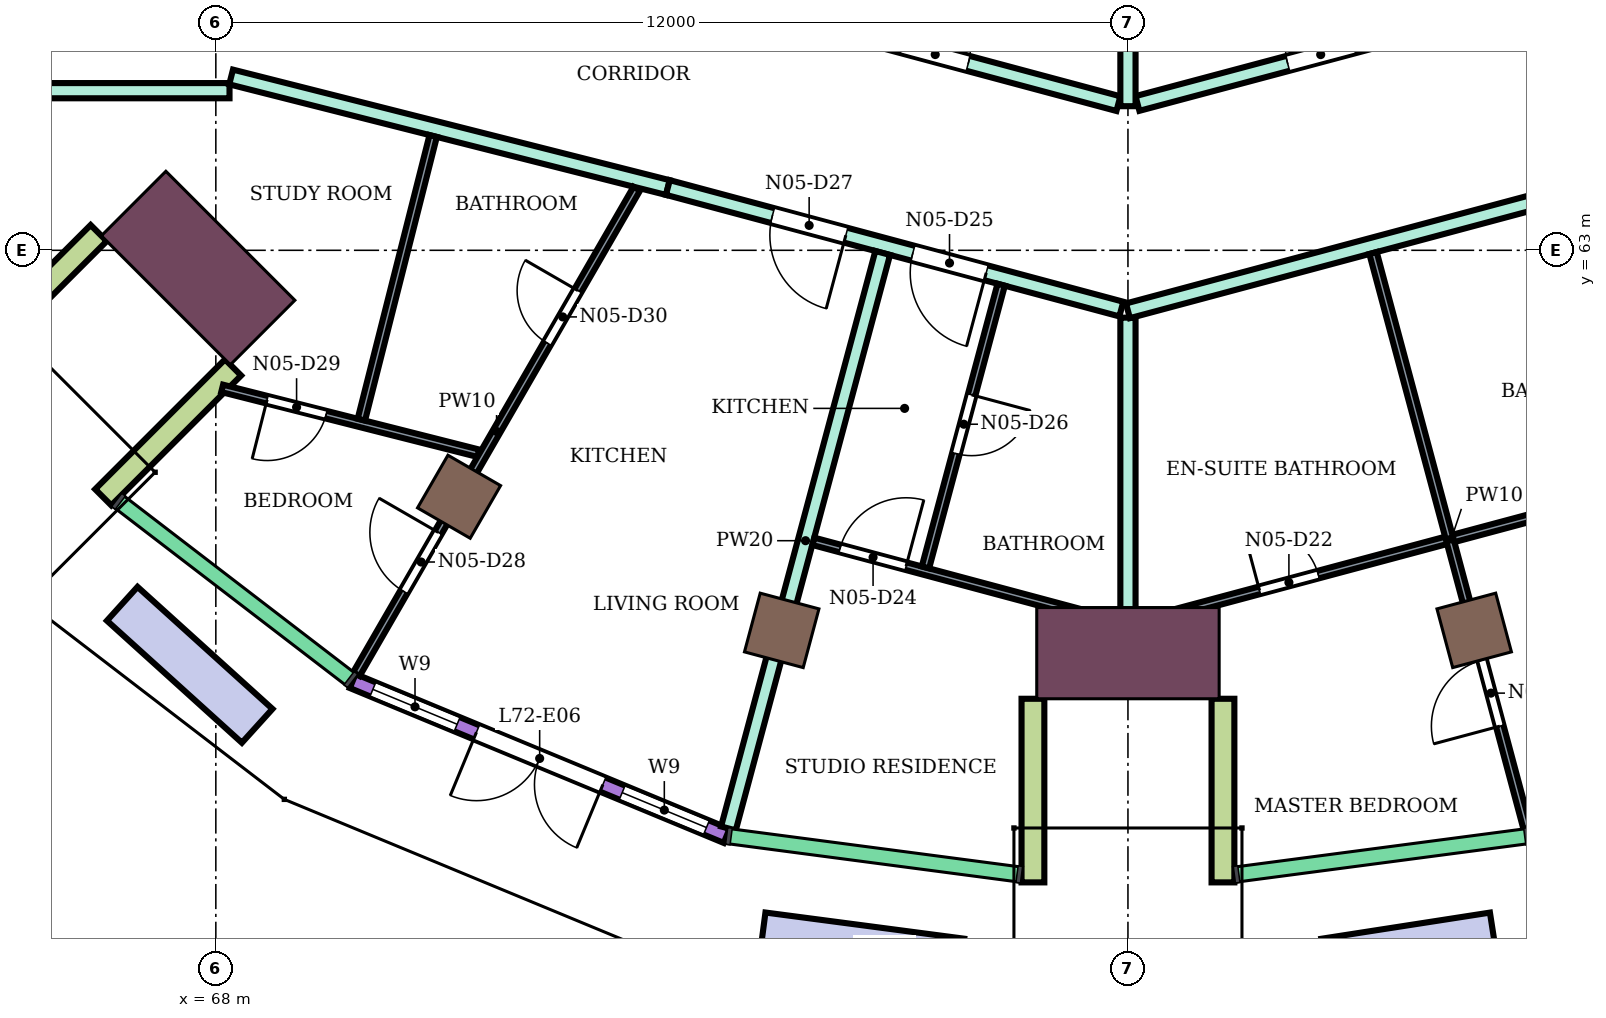
"""IFC4 building model, lengths in metres.
Left out: names, types, materials, properties, quantities, classifications, styles, units other than length and angle.
Written with IfcOpenShell. Run it as: python <this file> out.ifc"""

import sys

from ifc_helpers import new_model, si_unit, direction, frame, frame_2d, origin, origin_2d, place, context, subcontext, project, spatial, rectangle, extrude, element, fill, save


model = new_model("IFC4")
c1 = context("Model", 3, precision=1e-05, world=origin(), true_north=direction((0.0, 1.0)))
c2 = subcontext(c1, "Body", "Model", "MODEL_VIEW")
j1 = project(units=[si_unit("LENGTHUNIT", "METRE"), si_unit("PLANEANGLEUNIT", "RADIAN")], contexts=[c1])
p1 = place(None, origin())
s1 = spatial("IfcSite", under=j1, at=p1, CompositionType="ELEMENT")
p2 = place(p1, origin())
s2 = spatial("IfcBuilding", under=s1, at=p2, CompositionType="ELEMENT")
p3 = place(p2, frame((0.0, 0.0, 314.9)))
s3 = spatial("IfcBuildingStorey", under=s2, at=p3, CompositionType="ELEMENT", Elevation=314.9)
for number, where, z_axis, x_axis in (
    (1, (71.2, 59.758, 0.0), (0.0, 0.0, 1.0), (-0.5, -0.866, 0.0)),
    (2, (75.445, 58.0, 0.0), (0.0, 0.0, 1.0), (-0.259, -0.966, 0.0)),
    (3, (84.555, 58.0, 0.0), (0.0, 0.0, 1.0), (0.259, -0.966, 0.0)),
):
    element("IfcColumn", number, at=place(p3, frame(where, z_axis=z_axis, x_axis=x_axis)), inside=s3, PredefinedType="COLUMN", context=c2, shape_type="SweptSolid", body=[
        extrude(rectangle(XDim=0.8, YDim=0.8, at=origin_2d()), origin(), (0.0, 0.0, 1.0), 4.4),
    ])
for number, where, z_axis, x_axis in (
    (4, (67.767, 62.767, 0.0), (0.0, 0.0, 1.0), (-0.707, -0.707, 0.0)),
    (5, (80.0, 57.7, 0.0), (0.0, 0.0, 1.0), (0.0, -1.0, 0.0)),
):
    element("IfcColumn", number, at=place(p3, frame(where, z_axis=z_axis, x_axis=x_axis)), inside=s3, PredefinedType="COLUMN", context=c2, shape_type="SweptSolid", body=[
        extrude(rectangle(XDim=1.2, YDim=2.4, at=origin_2d()), origin(), (0.0, 0.0, 1.0), 4.4),
    ])
p4 = place(p3, frame((69.801, 57.334, 0.0), z_axis=(0.0, 0.0, 1.0), x_axis=(0.923876574156, -0.382690574388, 0.0)))
e6 = element("IfcWall", 6, at=p4, inside=s3, PredefinedType="NOTDEFINED", context=c2, shape_type="SweptSolid", body=[
    extrude(rectangle(XDim=5.325, YDim=0.2, at=frame_2d((2.663, 0.0))), origin(), (0.0, 0.0, 1.0), 4.4),
])
p5 = place(p4, frame((0.288, 0.0, 0.9)))
e7 = element("IfcOpeningElement", 7, at=p5, cuts=e6, PredefinedType="OPENING", context=c2, shape_type="SweptSolid", body=[
    extrude(rectangle(XDim=1.2, YDim=2.7, at=frame_2d((0.6, 1.35))), frame((0.0, 0.11, 0.0), z_axis=(0.0, -1.0, 0.0), x_axis=(1.0, 0.0, 0.0)), (0.0, 0.0, 1.0), 0.22),
])
p6 = place(p4, frame((1.763, 0.0, 0.0)))
e8 = element("IfcOpeningElement", 8, at=p6, cuts=e6, PredefinedType="OPENING", context=c2, shape_type="SweptSolid", body=[
    extrude(rectangle(XDim=1.8, YDim=2.7, at=frame_2d((0.9, 1.35))), frame((0.0, 0.11, 0.0), z_axis=(0.0, -1.0, 0.0), x_axis=(1.0, 0.0, 0.0)), (0.0, 0.0, 1.0), 0.22),
])
p7 = place(p4, frame((3.838, 0.0, 0.9)))
e9 = element("IfcOpeningElement", 9, at=p7, cuts=e6, PredefinedType="OPENING", context=c2, shape_type="SweptSolid", body=[
    extrude(rectangle(XDim=1.2, YDim=2.7, at=frame_2d((0.6, 1.35))), frame((0.0, 0.11, 0.0), z_axis=(0.0, -1.0, 0.0), x_axis=(1.0, 0.0, 0.0)), (0.0, 0.0, 1.0), 0.22),
])
for number, where, z_axis, x_axis in (
    (10, (66.459, 63.227, 0.0), (0.0, 0.0, 1.0), (-0.707, -0.707, 0.0)),
    (11, (68.227, 61.459, 0.0), (0.0, 0.0, 1.0), (-0.707, -0.707, 0.0)),
    (12, (78.75, 57.1, 0.0), (0.0, 0.0, 1.0), (0.0, -1.0, 0.0)),
    (13, (81.25, 57.1, 0.0), (0.0, 0.0, 1.0), (0.0, -1.0, 0.0)),
):
    element("IfcWall", number, at=place(p3, frame(where, z_axis=z_axis, x_axis=x_axis)), inside=s3, PredefinedType="NOTDEFINED", context=c2, shape_type="SweptSolid", body=[
        extrude(rectangle(XDim=2.416, YDim=0.3, at=frame_2d((1.208, 0.0))), origin(), (0.0, 0.0, 1.0), 4.4),
    ])
p8 = place(p3, frame((66.769, 58.35, 0.0), z_axis=(0.0, 0.0, 1.0), x_axis=(0.741658991894, -0.670777116293, 0.0)))
e14 = element("IfcWall", 14, at=p8, inside=s3, PredefinedType="USERDEFINED", context=c2, shape_type="SweptSolid", body=[
    extrude(rectangle(XDim=2.394, YDim=0.6, at=frame_2d((1.197, 0.0))), origin(), (0.0, 0.0, 1.0), 0.6),
])
p9 = place(p3, frame((75.192, 53.99, 0.0), z_axis=(0.0, 0.0, 1.0), x_axis=(0.991436014481, -0.130593373453, 0.0)))
e15 = element("IfcWall", 15, at=p9, inside=s3, PredefinedType="USERDEFINED", context=c2, shape_type="SweptSolid", body=[
    extrude(rectangle(XDim=2.638, YDim=0.6, at=frame_2d((1.319, 0.0))), origin(), (0.0, 0.0, 1.0), 0.6),
])
p10 = place(p3, frame((82.59, 53.646, 0.0), z_axis=(0.0, 0.0, 1.0), x_axis=(0.988158273159, 0.153438023927, 0.0)))
e16 = element("IfcWall", 16, at=p10, inside=s3, PredefinedType="USERDEFINED", context=c2, shape_type="SweptSolid", body=[
    extrude(rectangle(XDim=2.245, YDim=0.6, at=frame_2d((1.123, 0.0))), origin(), (0.0, 0.0, 1.0), 0.6),
])
p11 = place(p3, frame((65.2, 65.1, 0.0), z_axis=(0.0, 0.0, 1.0), x_axis=(1.0, 0.0, 0.0)))
e17 = element("IfcWall", 17, at=p11, inside=s3, PredefinedType="PARTITIONING", context=c2, shape_type="SweptSolid", body=[
    extrude(rectangle(XDim=2.98, YDim=0.2, at=frame_2d((1.49, 0.0))), origin(), (0.0, 0.0, 1.0), 3.95),
])
p12 = place(p3, frame((68.201, 65.28, 0.0), z_axis=(0.0, 0.0, 1.0), x_axis=(0.969421088032, -0.245403247897, 0.0)))
e18 = element("IfcWall", 18, at=p12, inside=s3, PredefinedType="PARTITIONING", context=c2, shape_type="SweptSolid", body=[
    extrude(rectangle(XDim=5.927, YDim=0.2, at=frame_2d((2.964, 0.0))), origin(), (0.0, 0.0, 1.0), 3.95),
])
p13 = place(p3, frame((73.947, 63.826, 0.0), z_axis=(0.0, 0.0, 1.0), x_axis=(0.965894934009, -0.25893430915, 0.0)))
e19 = element("IfcWall", 19, at=p13, inside=s3, PredefinedType="PARTITIONING", context=c2, shape_type="SweptSolid", body=[
    extrude(rectangle(XDim=6.177, YDim=0.2, at=frame_2d((3.088, 0.0))), origin(), (0.0, 0.0, 1.0), 3.95),
])
p14 = place(p13, frame((3.336, 0.0, 0.0)))
e20 = element("IfcOpeningElement", 20, at=p14, cuts=e19, PredefinedType="OPENING", context=c2, shape_type="SweptSolid", body=[
    extrude(rectangle(XDim=1.0, YDim=2.1, at=frame_2d((0.5, 1.05))), frame((0.0, 0.11, 0.0), z_axis=(0.0, -1.0, 0.0), x_axis=(1.0, 0.0, 0.0)), (0.0, 0.0, 1.0), 0.22),
])
p15 = place(p13, frame((1.424, 0.0, 0.0)))
e21 = element("IfcOpeningElement", 21, at=p15, cuts=e19, PredefinedType="OPENING", context=c2, shape_type="SweptSolid", body=[
    extrude(rectangle(XDim=1.0, YDim=2.1, at=frame_2d((0.5, 1.05))), frame((0.0, 0.11, 0.0), z_axis=(0.0, -1.0, 0.0), x_axis=(1.0, 0.0, 0.0)), (0.0, 0.0, 1.0), 0.22),
])
p16 = place(p3, frame((74.603, 66.342, 0.0), z_axis=(0.0, 0.0, 1.0), x_axis=(0.965920893652, -0.258837453254, 0.0)))
e22 = element("IfcWall", 22, at=p16, inside=s3, PredefinedType="PARTITIONING", context=c2, shape_type="SweptSolid", body=[
    extrude(rectangle(XDim=5.458, YDim=0.2, at=frame_2d((2.729, 0.0))), origin(), (0.0, 0.0, 1.0), 3.95),
])
p17 = place(p16, frame((2.512, 0.0, 0.0)))
e23 = element("IfcOpeningElement", 23, at=p17, cuts=e22, PredefinedType="OPENING", context=c2, shape_type="SweptSolid", body=[
    extrude(rectangle(XDim=0.9, YDim=2.1, at=frame_2d((0.45, 1.05))), frame((0.0, 0.11, 0.0), z_axis=(0.0, -1.0, 0.0), x_axis=(1.0, 0.0, 0.0)), (0.0, 0.0, 1.0), 0.22),
])
p18 = place(p3, frame((74.743, 55.394, 0.0), z_axis=(0.0, 0.0, 1.0), x_axis=(0.258969103378, 0.965885605802, 0.0)))
e24 = element("IfcWall", 24, at=p18, inside=s3, PredefinedType="PARTITIONING", context=c2, shape_type="SweptSolid", body=[
    extrude(rectangle(XDim=7.838, YDim=0.2, at=frame_2d((3.919, 0.0))), origin(), (0.0, 0.0, 1.0), 3.95),
])
p19 = place(p3, frame((80.125, 64.932, 0.0), z_axis=(0.0, 0.0, 1.0), x_axis=(0.966236955806, 0.257655089674, 0.0)))
e25 = element("IfcWall", 25, at=p19, inside=s3, PredefinedType="PARTITIONING", context=c2, shape_type="SweptSolid", body=[
    extrude(rectangle(XDim=8.039, YDim=0.2, at=frame_2d((4.02, 0.0))), origin(), (0.0, 0.0, 1.0), 3.95),
])
p20 = place(p19, frame((6.298, 0.0, 0.0)))
e26 = element("IfcOpeningElement", 26, at=p20, cuts=e25, PredefinedType="OPENING", context=c2, shape_type="SweptSolid", body=[
    extrude(rectangle(XDim=0.9, YDim=2.1, at=frame_2d((0.45, 1.05))), frame((0.0, 0.11, 0.0), z_axis=(0.0, -1.0, 0.0), x_axis=(1.0, 0.0, 0.0)), (0.0, 0.0, 1.0), 0.22),
])
p21 = place(p19, frame((2.045, 0.0, 0.0)))
e27 = element("IfcOpeningElement", 27, at=p21, cuts=e25, PredefinedType="OPENING", context=c2, shape_type="SweptSolid", body=[
    extrude(rectangle(XDim=0.9, YDim=2.1, at=frame_2d((0.45, 1.05))), frame((0.0, 0.11, 0.0), z_axis=(0.0, -1.0, 0.0), x_axis=(1.0, 0.0, 0.0)), (0.0, 0.0, 1.0), 0.22),
])
p22 = place(p3, frame((80.0, 57.3, 0.0), z_axis=(0.0, 0.0, 1.0), x_axis=(0.0, 1.0, 0.0)))
e28 = element("IfcWall", 28, at=p22, inside=s3, PredefinedType="PARTITIONING", context=c2, shape_type="SweptSolid", body=[
    extrude(rectangle(XDim=4.814, YDim=0.2, at=frame_2d((2.407, 0.0))), origin(), (0.0, 0.0, 1.0), 3.95),
])
p23 = place(p3, frame((80.0, 62.204, 0.0), z_axis=(0.0, 0.0, 1.0), x_axis=(0.965938139786, 0.258773086132, 0.0)))
e29 = element("IfcWall", 29, at=p23, inside=s3, PredefinedType="PARTITIONING", context=c2, shape_type="SweptSolid", body=[
    extrude(rectangle(XDim=6.266, YDim=0.2, at=frame_2d((3.133, 0.0))), origin(), (0.0, 0.0, 1.0), 3.95),
])
p24 = place(p3, frame((80.0, 64.896, 0.0), z_axis=(0.0, 0.0, 1.0), x_axis=(0.0, 1.0, 0.0)))
e30 = element("IfcWall", 30, at=p24, inside=s3, PredefinedType="PARTITIONING", context=c2, shape_type="SweptSolid", body=[
    extrude(rectangle(XDim=2.405, YDim=0.2, at=frame_2d((1.203, 0.0))), origin(), (0.0, 0.0, 1.0), 3.95),
])
p25 = place(p3, frame((68.083, 61.184, 0.0), z_axis=(0.0, 0.0, 1.0), x_axis=(0.969415105271, -0.245426880503, 0.0)))
e31 = element("IfcWall", 31, at=p25, inside=s3, PredefinedType="PARTITIONING", context=c2, shape_type="SweptSolid", body=[
    extrude(rectangle(XDim=3.476, YDim=0.1, at=frame_2d((1.738, 0.0))), origin(), (0.0, 0.0, 1.0), 3.95),
])
p26 = place(p25, frame((0.61, 0.0, 0.0)))
e32 = element("IfcOpeningElement", 32, at=p26, cuts=e31, PredefinedType="OPENING", context=c2, shape_type="SweptSolid", body=[
    extrude(rectangle(XDim=0.8, YDim=2.1, at=frame_2d((0.4, 1.05))), frame((0.0, 0.06, 0.0), z_axis=(0.0, -1.0, 0.0), x_axis=(1.0, 0.0, 0.0)), (0.0, 0.0, 1.0), 0.12),
])
p27 = place(p3, frame((69.849, 57.424, 0.0), z_axis=(0.0, 0.0, 1.0), x_axis=(0.500112137663, 0.865960651394, 0.0)))
e33 = element("IfcWall", 33, at=p27, inside=s3, PredefinedType="PARTITIONING", context=c2, shape_type="SweptSolid", body=[
    extrude(rectangle(XDim=7.375, YDim=0.1, at=frame_2d((3.688, 0.0))), origin(), (0.0, 0.0, 1.0), 3.95),
])
p28 = place(p27, frame((1.254, 0.0, 0.0)))
e34 = element("IfcOpeningElement", 34, at=p28, cuts=e33, PredefinedType="OPENING", context=c2, shape_type="SweptSolid", body=[
    extrude(rectangle(XDim=0.9, YDim=2.1, at=frame_2d((0.45, 1.05))), frame((0.0, 0.06, 0.0), z_axis=(0.0, -1.0, 0.0), x_axis=(1.0, 0.0, 0.0)), (0.0, 0.0, 1.0), 0.12),
])
p29 = place(p27, frame((5.027, 0.0, 0.0)))
e35 = element("IfcOpeningElement", 35, at=p29, cuts=e33, PredefinedType="OPENING", context=c2, shape_type="SweptSolid", body=[
    extrude(rectangle(XDim=0.8, YDim=2.1, at=frame_2d((0.4, 1.05))), frame((0.0, 0.06, 0.0), z_axis=(0.0, -1.0, 0.0), x_axis=(1.0, 0.0, 0.0)), (0.0, 0.0, 1.0), 0.12),
])
p30 = place(p3, frame((69.914, 60.772, 0.0), z_axis=(0.0, 0.0, 1.0), x_axis=(0.245489008107, 0.969399374303, 0.0)))
e36 = element("IfcWall", 36, at=p30, inside=s3, PredefinedType="PARTITIONING", context=c2, shape_type="SweptSolid", body=[
    extrude(rectangle(XDim=3.85, YDim=0.1, at=frame_2d((1.925, 0.0))), origin(), (0.0, 0.0, 1.0), 3.95),
])
p31 = place(p3, frame((75.862, 59.171, 0.0), z_axis=(0.0, 0.0, 1.0), x_axis=(0.965961623338, -0.258685411723, 0.0)))
e37 = element("IfcWall", 37, at=p31, inside=s3, PredefinedType="PARTITIONING", context=c2, shape_type="SweptSolid", body=[
    extrude(rectangle(XDim=4.174, YDim=0.1, at=frame_2d((2.087, 0.0))), origin(), (0.0, 0.0, 1.0), 3.95),
])
p32 = place(p31, frame((0.363, 0.0, 0.0)))
e38 = element("IfcOpeningElement", 38, at=p32, cuts=e37, PredefinedType="OPENING", context=c2, shape_type="SweptSolid", body=[
    extrude(rectangle(XDim=0.9, YDim=2.1, at=frame_2d((0.45, 1.05))), frame((0.0, 0.06, 0.0), z_axis=(0.0, -1.0, 0.0), x_axis=(1.0, 0.0, 0.0)), (0.0, 0.0, 1.0), 0.12),
])
p33 = place(p3, frame((77.336, 58.828, 0.0), z_axis=(0.0, 0.0, 1.0), x_axis=(0.25872023695, 0.965952296437, 0.0)))
e39 = element("IfcWall", 39, at=p33, inside=s3, PredefinedType="PARTITIONING", context=c2, shape_type="SweptSolid", body=[
    extrude(rectangle(XDim=3.85, YDim=0.1, at=frame_2d((1.925, 0.0))), origin(), (0.0, 0.0, 1.0), 3.95),
])
p34 = place(p33, frame((1.55, 0.0, 0.0)))
e40 = element("IfcOpeningElement", 40, at=p34, cuts=e39, PredefinedType="OPENING", context=c2, shape_type="SweptSolid", body=[
    extrude(rectangle(XDim=0.8, YDim=2.1, at=frame_2d((0.4, 1.05))), frame((0.0, 0.06, 0.0), z_axis=(0.0, -1.0, 0.0), x_axis=(1.0, 0.0, 0.0)), (0.0, 0.0, 1.0), 0.12),
])
p35 = place(p3, frame((80.106, 58.092, 0.0), z_axis=(0.0, 0.0, 1.0), x_axis=(0.965971139599, 0.258649874274, 0.0)))
e41 = element("IfcWall", 41, at=p35, inside=s3, PredefinedType="PARTITIONING", context=c2, shape_type="SweptSolid", body=[
    extrude(rectangle(XDim=8.588, YDim=0.1, at=frame_2d((4.294, 0.0))), origin(), (0.0, 0.0, 1.0), 3.95),
])
p36 = place(p35, frame((1.682, 0.0, 0.0)))
e42 = element("IfcOpeningElement", 42, at=p36, cuts=e41, PredefinedType="OPENING", context=c2, shape_type="SweptSolid", body=[
    extrude(rectangle(XDim=0.8, YDim=2.1, at=frame_2d((0.4, 1.05))), frame((0.0, 0.06, 0.0), z_axis=(0.0, -1.0, 0.0), x_axis=(1.0, 0.0, 0.0)), (0.0, 0.0, 1.0), 0.12),
])
p37 = place(p3, frame((83.224, 62.964, 0.0), z_axis=(0.0, 0.0, 1.0), x_axis=(0.258779160476, -0.96593651246, 0.0)))
e43 = element("IfcWall", 43, at=p37, inside=s3, PredefinedType="PARTITIONING", context=c2, shape_type="SweptSolid", body=[
    extrude(rectangle(XDim=7.838, YDim=0.1, at=frame_2d((3.919, 0.0))), origin(), (0.0, 0.0, 1.0), 3.95),
])
p38 = place(p37, frame((5.544, 0.0, 0.0)))
e44 = element("IfcOpeningElement", 44, at=p38, cuts=e43, PredefinedType="OPENING", context=c2, shape_type="SweptSolid", body=[
    extrude(rectangle(XDim=0.9, YDim=2.1, at=frame_2d((0.45, 1.05))), frame((0.0, 0.06, 0.0), z_axis=(0.0, -1.0, 0.0), x_axis=(1.0, 0.0, 0.0)), (0.0, 0.0, 1.0), 0.12),
])
p39 = place(p5, origin())
e45 = element("IfcWindow", 45, at=p39, inside=s3, PartitioningType="SINGLE_PANEL", PredefinedType="WINDOW", context=c2, shape_type="SweptSolid", body=[
    extrude(rectangle(XDim=1.2, YDim=2.7, at=frame_2d((0.6, 1.35))), frame((0.0, 0.03, 0.0), z_axis=(0.0, -1.0, 0.0), x_axis=(1.0, 0.0, 0.0)), (0.0, 0.0, 1.0), 0.06),
])
fill(e7, e45)
p40 = place(p6, frame((1.8, 0.0, 0.0), z_axis=(0.0, 0.0, 1.0), x_axis=(-1.0, 0.0, 0.0)))
e46 = element("IfcDoor", 46, at=p40, inside=s3, OperationType="DOUBLE_DOOR_SINGLE_SWING", PredefinedType="DOOR", context=c2, shape_type="SweptSolid", body=[
    extrude(rectangle(XDim=1.8, YDim=2.7, at=frame_2d((0.9, 1.35))), frame((0.0, 0.025, 0.0), z_axis=(0.0, -1.0, 0.0), x_axis=(1.0, 0.0, 0.0)), (0.0, 0.0, 1.0), 0.05),
])
fill(e8, e46)
p41 = place(p7, origin())
e47 = element("IfcWindow", 47, at=p41, inside=s3, PartitioningType="SINGLE_PANEL", PredefinedType="WINDOW", context=c2, shape_type="SweptSolid", body=[
    extrude(rectangle(XDim=1.2, YDim=2.7, at=frame_2d((0.6, 1.35))), frame((0.0, 0.03, 0.0), z_axis=(0.0, -1.0, 0.0), x_axis=(1.0, 0.0, 0.0)), (0.0, 0.0, 1.0), 0.06),
])
fill(e9, e47)
p42 = place(p38, frame((0.9, 0.0, 0.0), z_axis=(0.0, 0.0, 1.0), x_axis=(-1.0, 0.0, 0.0)))
e48 = element("IfcDoor", 48, at=p42, inside=s3, OperationType="SINGLE_SWING_LEFT", PredefinedType="DOOR", context=c2, shape_type="SweptSolid", body=[
    extrude(rectangle(XDim=0.9, YDim=2.1, at=frame_2d((0.45, 1.05))), frame((0.0, 0.025, 0.0), z_axis=(0.0, -1.0, 0.0), x_axis=(1.0, 0.0, 0.0)), (0.0, 0.0, 1.0), 0.05),
])
fill(e44, e48)
p43 = place(p36, origin())
e49 = element("IfcDoor", 49, at=p43, inside=s3, OperationType="SINGLE_SWING_LEFT", PredefinedType="DOOR", context=c2, shape_type="SweptSolid", body=[
    extrude(rectangle(XDim=0.8, YDim=2.1, at=frame_2d((0.4, 1.05))), frame((0.0, 0.025, 0.0), z_axis=(0.0, -1.0, 0.0), x_axis=(1.0, 0.0, 0.0)), (0.0, 0.0, 1.0), 0.05),
])
fill(e42, e49)
p44 = place(p32, origin())
e50 = element("IfcDoor", 50, at=p44, inside=s3, OperationType="SINGLE_SWING_RIGHT", PredefinedType="DOOR", context=c2, shape_type="SweptSolid", body=[
    extrude(rectangle(XDim=0.9, YDim=2.1, at=frame_2d((0.45, 1.05))), frame((0.0, 0.025, 0.0), z_axis=(0.0, -1.0, 0.0), x_axis=(1.0, 0.0, 0.0)), (0.0, 0.0, 1.0), 0.05),
])
fill(e38, e50)
p45 = place(p14, frame((1.0, 0.0, 0.0), z_axis=(0.0, 0.0, 1.0), x_axis=(-1.0, 0.0, 0.0)))
e51 = element("IfcDoor", 51, at=p45, inside=s3, OperationType="SINGLE_SWING_LEFT", PredefinedType="DOOR", context=c2, shape_type="SweptSolid", body=[
    extrude(rectangle(XDim=1.0, YDim=2.1, at=frame_2d((0.5, 1.05))), frame((0.0, 0.025, 0.0), z_axis=(0.0, -1.0, 0.0), x_axis=(1.0, 0.0, 0.0)), (0.0, 0.0, 1.0), 0.05),
])
fill(e20, e51)
p46 = place(p34, frame((0.8, 0.0, 0.0), z_axis=(0.0, 0.0, 1.0), x_axis=(-1.0, 0.0, 0.0)))
e52 = element("IfcDoor", 52, at=p46, inside=s3, OperationType="SINGLE_SWING_LEFT", PredefinedType="DOOR", context=c2, shape_type="SweptSolid", body=[
    extrude(rectangle(XDim=0.8, YDim=2.1, at=frame_2d((0.4, 1.05))), frame((0.0, 0.025, 0.0), z_axis=(0.0, -1.0, 0.0), x_axis=(1.0, 0.0, 0.0)), (0.0, 0.0, 1.0), 0.05),
])
fill(e40, e52)
p47 = place(p15, frame((1.0, 0.0, 0.0), z_axis=(0.0, 0.0, 1.0), x_axis=(-1.0, 0.0, 0.0)))
e53 = element("IfcDoor", 53, at=p47, inside=s3, OperationType="SINGLE_SWING_LEFT", PredefinedType="DOOR", context=c2, shape_type="SweptSolid", body=[
    extrude(rectangle(XDim=1.0, YDim=2.1, at=frame_2d((0.5, 1.05))), frame((0.0, 0.025, 0.0), z_axis=(0.0, -1.0, 0.0), x_axis=(1.0, 0.0, 0.0)), (0.0, 0.0, 1.0), 0.05),
])
fill(e21, e53)
p48 = place(p28, origin())
e54 = element("IfcDoor", 54, at=p48, inside=s3, OperationType="SINGLE_SWING_RIGHT", PredefinedType="DOOR", context=c2, shape_type="SweptSolid", body=[
    extrude(rectangle(XDim=0.9, YDim=2.1, at=frame_2d((0.45, 1.05))), frame((0.0, 0.025, 0.0), z_axis=(0.0, -1.0, 0.0), x_axis=(1.0, 0.0, 0.0)), (0.0, 0.0, 1.0), 0.05),
])
fill(e34, e54)
p49 = place(p26, frame((0.8, 0.0, 0.0), z_axis=(0.0, 0.0, 1.0), x_axis=(-1.0, 0.0, 0.0)))
e55 = element("IfcDoor", 55, at=p49, inside=s3, OperationType="SINGLE_SWING_RIGHT", PredefinedType="DOOR", context=c2, shape_type="SweptSolid", body=[
    extrude(rectangle(XDim=0.8, YDim=2.1, at=frame_2d((0.4, 1.05))), frame((0.0, 0.025, 0.0), z_axis=(0.0, -1.0, 0.0), x_axis=(1.0, 0.0, 0.0)), (0.0, 0.0, 1.0), 0.05),
])
fill(e32, e55)
p50 = place(p29, origin())
e56 = element("IfcDoor", 56, at=p50, inside=s3, OperationType="SINGLE_SWING_RIGHT", PredefinedType="DOOR", context=c2, shape_type="SweptSolid", body=[
    extrude(rectangle(XDim=0.8, YDim=2.1, at=frame_2d((0.4, 1.05))), frame((0.0, 0.025, 0.0), z_axis=(0.0, -1.0, 0.0), x_axis=(1.0, 0.0, 0.0)), (0.0, 0.0, 1.0), 0.05),
])
fill(e35, e56)
p51 = place(p21, origin())
e57 = element("IfcDoor", 57, at=p51, inside=s3, OperationType="SINGLE_SWING_RIGHT", PredefinedType="DOOR", context=c2, shape_type="SweptSolid", body=[
    extrude(rectangle(XDim=0.9, YDim=2.1, at=frame_2d((0.45, 1.05))), frame((0.0, 0.025, 0.0), z_axis=(0.0, -1.0, 0.0), x_axis=(1.0, 0.0, 0.0)), (0.0, 0.0, 1.0), 0.05),
])
fill(e27, e57)
p52 = place(p17, origin())
e58 = element("IfcDoor", 58, at=p52, inside=s3, OperationType="SINGLE_SWING_LEFT", PredefinedType="DOOR", context=c2, shape_type="SweptSolid", body=[
    extrude(rectangle(XDim=0.9, YDim=2.1, at=frame_2d((0.45, 1.05))), frame((0.0, 0.025, 0.0), z_axis=(0.0, -1.0, 0.0), x_axis=(1.0, 0.0, 0.0)), (0.0, 0.0, 1.0), 0.05),
])
fill(e23, e58)
save(model, sys.argv[1])
